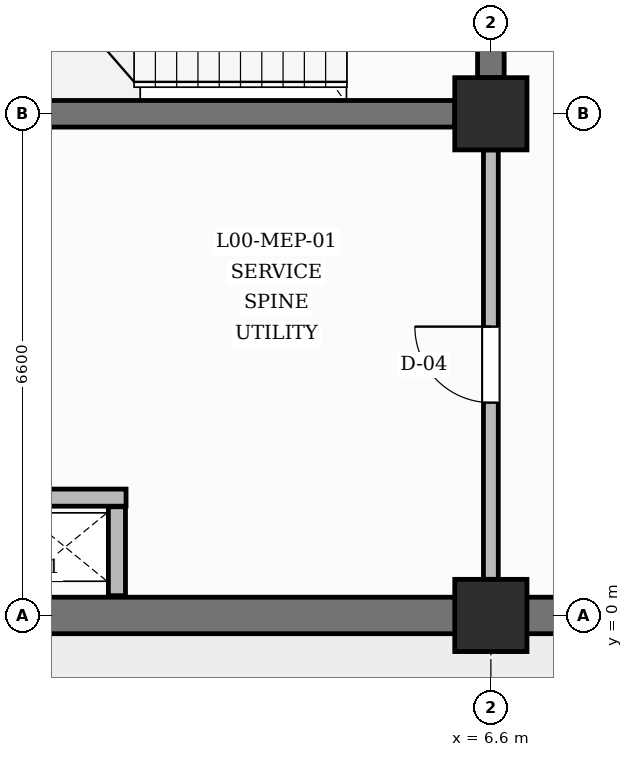
"""IFC4 building model, lengths in metres.
Left out: names, types, materials, properties, quantities, classifications, styles, units other than length and angle.
Written with IfcOpenShell. Run it as: python <this file> out.ifc"""

import sys

from ifc_helpers import new_model, si_unit, direction, frame, frame_2d, origin, origin_2d, place, context, subcontext, project, spatial, rectangle, extrude, element, fill, save


model = new_model("IFC4")
c1 = context("Model", 3, precision=1e-05, world=origin(), true_north=direction((0.0, 1.0)))
c2 = subcontext(c1, "Body", "Model", "MODEL_VIEW")
j1 = project(units=[si_unit("LENGTHUNIT", "METRE"), si_unit("PLANEANGLEUNIT", "RADIAN")], contexts=[c1])
p1 = place(None, origin())
s1 = spatial("IfcSite", under=j1, at=p1, CompositionType="ELEMENT")
p2 = place(p1, origin())
s2 = spatial("IfcBuilding", under=s1, at=p2, CompositionType="ELEMENT")
p3 = place(p2, origin())
s3 = spatial("IfcBuildingStorey", under=s2, at=p3, CompositionType="ELEMENT", Elevation=0.0)
for number, where, z_axis, x_axis in (
    (1, (6.6, 0.0, 0.0), (0.0, 0.0, 1.0), (1.0, 0.0, 0.0)),
    (2, (6.6, 6.6, 0.0), (0.0, 0.0, 1.0), (1.0, 0.0, 0.0)),
):
    element("IfcColumn", number, at=place(p3, frame(where, z_axis=z_axis, x_axis=x_axis)), inside=s3, PredefinedType="COLUMN", context=c2, shape_type="SweptSolid", body=[
        extrude(rectangle(XDim=0.95, YDim=0.95, at=origin_2d()), origin(), (0.0, 0.0, 1.0), 5.4),
    ])
p4 = place(p3, frame((0.475, 0.0, 0.0), z_axis=(0.0, 0.0, 1.0), x_axis=(1.0, 0.0, 0.0)))
e3 = element("IfcWall", 3, at=p4, inside=s3, PredefinedType="SOLIDWALL", context=c2, shape_type="SweptSolid", body=[
    extrude(rectangle(XDim=5.65, YDim=0.48, at=frame_2d((2.825, 0.0))), origin(), (0.0, 0.0, 1.0), 4.45),
])
p5 = place(p3, frame((7.075, 0.0, 0.0), z_axis=(0.0, 0.0, 1.0), x_axis=(1.0, 0.0, 0.0)))
e4 = element("IfcWall", 4, at=p5, inside=s3, PredefinedType="SOLIDWALL", context=c2, shape_type="SweptSolid", body=[
    extrude(rectangle(XDim=5.65, YDim=0.48, at=frame_2d((2.825, 0.0))), origin(), (0.0, 0.0, 1.0), 4.45),
])
p6 = place(p3, frame((0.475, 6.6, 0.0), z_axis=(0.0, 0.0, 1.0), x_axis=(1.0, 0.0, 0.0)))
e5 = element("IfcWall", 5, at=p6, inside=s3, PredefinedType="SHEAR", context=c2, shape_type="SweptSolid", body=[
    extrude(rectangle(XDim=5.65, YDim=0.35, at=frame_2d((2.825, 0.0))), origin(), (0.0, 0.0, 1.0), 4.3),
])
p7 = place(p3, frame((6.6, 7.075, 0.0), z_axis=(0.0, 0.0, 1.0), x_axis=(0.0, 1.0, 0.0)))
e6 = element("IfcWall", 6, at=p7, inside=s3, PredefinedType="SHEAR", context=c2, shape_type="SweptSolid", body=[
    extrude(rectangle(XDim=5.65, YDim=0.35, at=frame_2d((2.825, 0.0))), origin(), (0.0, 0.0, 1.0), 4.3),
])
p8 = place(p7, frame((2.25, 0.0, 0.0)))
e7 = element("IfcOpeningElement", 7, at=p8, cuts=e6, PredefinedType="OPENING", context=c2, shape_type="SweptSolid", body=[
    extrude(rectangle(XDim=1.15, YDim=2.2, at=frame_2d((0.575, 1.1))), frame((0.0, 0.185, 0.0), z_axis=(0.0, -1.0, 0.0), x_axis=(1.0, 0.0, 0.0)), (0.0, 0.0, 1.0), 0.37),
])
p9 = place(p3, frame((1.68, 0.26, 0.0), z_axis=(0.0, 0.0, 1.0), x_axis=(0.0, 1.0, 0.0)))
e8 = element("IfcWall", 8, at=p9, inside=s3, PredefinedType="PARTITIONING", context=c2, shape_type="SweptSolid", body=[
    extrude(rectangle(XDim=1.17, YDim=0.225, at=frame_2d((0.585, 0.0))), origin(), (0.0, 0.0, 1.0), 5.05),
])
p10 = place(p3, frame((0.26, 1.55, 0.0), z_axis=(0.0, 0.0, 1.0), x_axis=(1.0, 0.0, 0.0)))
e9 = element("IfcWall", 9, at=p10, inside=s3, PredefinedType="PARTITIONING", context=c2, shape_type="SweptSolid", body=[
    extrude(rectangle(XDim=1.54, YDim=0.225, at=frame_2d((0.77, 0.0))), origin(), (0.0, 0.0, 1.0), 5.05),
])
p11 = place(p3, frame((6.6, 0.475, 0.0), z_axis=(0.0, 0.0, 1.0), x_axis=(0.0, 1.0, 0.0)))
e10 = element("IfcWall", 10, at=p11, inside=s3, PredefinedType="PARTITIONING", context=c2, shape_type="SweptSolid", body=[
    extrude(rectangle(XDim=5.65, YDim=0.195, at=frame_2d((2.825, 0.0))), origin(), (0.0, 0.0, 1.0), 4.3),
])
p12 = place(p11, frame((2.325, 0.0, 0.0)))
e11 = element("IfcOpeningElement", 11, at=p12, cuts=e10, PredefinedType="OPENING", context=c2, shape_type="SweptSolid", body=[
    extrude(rectangle(XDim=1.0, YDim=2.1, at=frame_2d((0.5, 1.05))), frame((0.0, 0.107, 0.0), z_axis=(0.0, -1.0, 0.0), x_axis=(1.0, 0.0, 0.0)), (0.0, 0.0, 1.0), 0.215),
])
p13 = place(p12, origin())
e12 = element("IfcDoor", 12, at=p13, inside=s3, OperationType="SINGLE_SWING_RIGHT", PredefinedType="DOOR", context=c2, shape_type="SweptSolid", body=[
    extrude(rectangle(XDim=1.0, YDim=2.1, at=frame_2d((0.5, 1.05))), frame((0.0, 0.025, 0.0), z_axis=(0.0, -1.0, 0.0), x_axis=(1.0, 0.0, 0.0)), (0.0, 0.0, 1.0), 0.05),
])
fill(e11, e12)
save(model, sys.argv[1])
